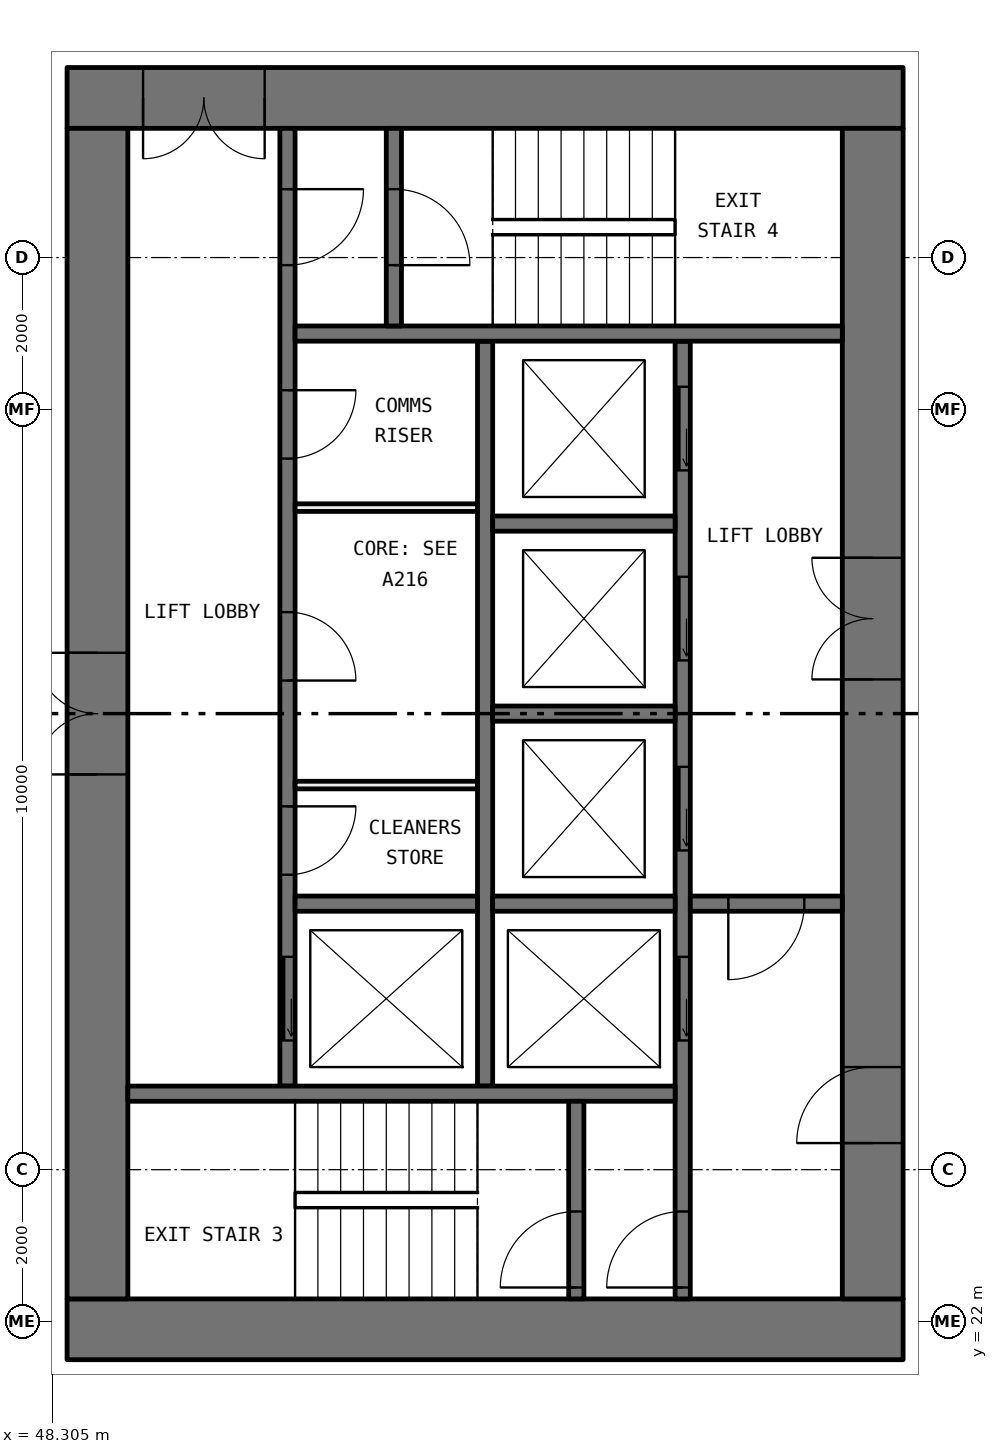
"""IFC4 building model, lengths in metres.
Left out: names, types, materials, properties, quantities, classifications, styles, units other than length and angle.
Written with IfcOpenShell. Run it as: python <this file> out.ifc"""

import sys

from ifc_helpers import new_model, si_unit, direction, frame, frame_2d, origin, place, context, subcontext, project, spatial, rectangle, extrude, element, fill, save


model = new_model("IFC4")
c1 = context("Model", 3, precision=1e-05, world=origin(), true_north=direction((0.0, 1.0)))
c2 = subcontext(c1, "Body", "Model", "MODEL_VIEW")
j1 = project(units=[si_unit("LENGTHUNIT", "METRE"), si_unit("PLANEANGLEUNIT", "RADIAN")], contexts=[c1])
p1 = place(None, origin())
s1 = spatial("IfcSite", under=j1, at=p1, CompositionType="ELEMENT")
p2 = place(p1, origin())
s2 = spatial("IfcBuilding", under=s1, at=p2, CompositionType="ELEMENT")
p3 = place(p2, frame((0.0, 0.0, 64.5)))
s3 = spatial("IfcBuildingStorey", under=s2, at=p3, CompositionType="ELEMENT", Elevation=64.5)
p4 = place(p3, frame((59.5, 21.9, 0.0), z_axis=(0.0, 0.0, 1.0), x_axis=(-1.0, 0.0, 0.0)))
e1 = element("IfcWall", 1, at=p4, inside=s3, PredefinedType="SHEAR", context=c2, shape_type="SweptSolid", body=[
    extrude(rectangle(XDim=11.0, YDim=0.8, at=frame_2d((5.5, 0.0))), origin(), (0.0, 0.0, 1.0), 3.05),
])
p5 = place(p3, frame((59.5, 38.1, 0.0), z_axis=(0.0, 0.0, 1.0), x_axis=(-1.0, 0.0, 0.0)))
e2 = element("IfcWall", 2, at=p5, inside=s3, PredefinedType="SHEAR", context=c2, shape_type="SweptSolid", body=[
    extrude(rectangle(XDim=11.0, YDim=0.8, at=frame_2d((5.5, 0.0))), origin(), (0.0, 0.0, 1.0), 3.05),
])
p6 = place(p5, frame((8.4, 0.0, 0.0)))
e3 = element("IfcOpeningElement", 3, at=p6, cuts=e2, PredefinedType="OPENING", context=c2, shape_type="SweptSolid", body=[
    extrude(rectangle(XDim=1.6, YDim=2.1, at=frame_2d((0.8, 1.05))), frame((0.0, 0.41, 0.0), z_axis=(0.0, -1.0, 0.0), x_axis=(1.0, 0.0, 0.0)), (0.0, 0.0, 1.0), 0.82),
])
p7 = place(p3, frame((59.1, 22.3, 0.0), z_axis=(0.0, 0.0, 1.0), x_axis=(0.0, 1.0, 0.0)))
e4 = element("IfcWall", 4, at=p7, inside=s3, PredefinedType="SHEAR", context=c2, shape_type="SweptSolid", body=[
    extrude(rectangle(XDim=15.4, YDim=0.8, at=frame_2d((7.7, 0.0))), origin(), (0.0, 0.0, 1.0), 3.05),
])
p8 = place(p7, frame((8.15, 0.0, 0.0)))
e5 = element("IfcOpeningElement", 5, at=p8, cuts=e4, PredefinedType="OPENING", context=c2, shape_type="SweptSolid", body=[
    extrude(rectangle(XDim=1.6, YDim=2.1, at=frame_2d((0.8, 1.05))), frame((0.0, 0.41, 0.0), z_axis=(0.0, -1.0, 0.0), x_axis=(1.0, 0.0, 0.0)), (0.0, 0.0, 1.0), 0.82),
])
p9 = place(p7, frame((2.05, 0.0, 0.0)))
e6 = element("IfcOpeningElement", 6, at=p9, cuts=e4, PredefinedType="OPENING", context=c2, shape_type="SweptSolid", body=[
    extrude(rectangle(XDim=1.0, YDim=2.1, at=frame_2d((0.5, 1.05))), frame((0.0, 0.41, 0.0), z_axis=(0.0, -1.0, 0.0), x_axis=(1.0, 0.0, 0.0)), (0.0, 0.0, 1.0), 0.82),
])
p10 = place(p3, frame((48.9, 22.3, 0.0), z_axis=(0.0, 0.0, 1.0), x_axis=(0.0, 1.0, 0.0)))
e7 = element("IfcWall", 7, at=p10, inside=s3, PredefinedType="SHEAR", context=c2, shape_type="SweptSolid", body=[
    extrude(rectangle(XDim=15.4, YDim=0.8, at=frame_2d((7.7, 0.0))), origin(), (0.0, 0.0, 1.0), 3.05),
])
p11 = place(p10, frame((6.9, 0.0, 0.0)))
e8 = element("IfcOpeningElement", 8, at=p11, cuts=e7, PredefinedType="OPENING", context=c2, shape_type="SweptSolid", body=[
    extrude(rectangle(XDim=1.6, YDim=2.1, at=frame_2d((0.8, 1.05))), frame((0.0, 0.41, 0.0), z_axis=(0.0, -1.0, 0.0), x_axis=(1.0, 0.0, 0.0)), (0.0, 0.0, 1.0), 0.82),
])
p12 = place(p3, frame((56.6, 22.3, 0.0), z_axis=(0.0, 0.0, 1.0), x_axis=(0.0, 1.0, 0.0)))
e9 = element("IfcWall", 9, at=p12, inside=s3, PredefinedType="SOLIDWALL", context=c2, shape_type="SweptSolid", body=[
    extrude(rectangle(XDim=12.6, YDim=0.2, at=frame_2d((6.3, 0.0))), origin(), (0.0, 0.0, 1.0), 3.05),
])
p13 = place(p12, frame((3.4, 0.0, 0.0)))
e10 = element("IfcOpeningElement", 10, at=p13, cuts=e9, PredefinedType="OPENING", context=c2, shape_type="SweptSolid", body=[
    extrude(rectangle(XDim=1.1, YDim=2.1, at=frame_2d((0.55, 1.05))), frame((0.0, 0.11, 0.0), z_axis=(0.0, -1.0, 0.0), x_axis=(1.0, 0.0, 0.0)), (0.0, 0.0, 1.0), 0.22),
])
p14 = place(p12, frame((5.9, 0.0, 0.0)))
e11 = element("IfcOpeningElement", 11, at=p14, cuts=e9, PredefinedType="OPENING", context=c2, shape_type="SweptSolid", body=[
    extrude(rectangle(XDim=1.1, YDim=2.1, at=frame_2d((0.55, 1.05))), frame((0.0, 0.11, 0.0), z_axis=(0.0, -1.0, 0.0), x_axis=(1.0, 0.0, 0.0)), (0.0, 0.0, 1.0), 0.22),
])
p15 = place(p12, frame((8.4, 0.0, 0.0)))
e12 = element("IfcOpeningElement", 12, at=p15, cuts=e9, PredefinedType="OPENING", context=c2, shape_type="SweptSolid", body=[
    extrude(rectangle(XDim=1.1, YDim=2.1, at=frame_2d((0.55, 1.05))), frame((0.0, 0.11, 0.0), z_axis=(0.0, -1.0, 0.0), x_axis=(1.0, 0.0, 0.0)), (0.0, 0.0, 1.0), 0.22),
])
p16 = place(p12, frame((10.9, 0.0, 0.0)))
e13 = element("IfcOpeningElement", 13, at=p16, cuts=e9, PredefinedType="OPENING", context=c2, shape_type="SweptSolid", body=[
    extrude(rectangle(XDim=1.1, YDim=2.1, at=frame_2d((0.55, 1.05))), frame((0.0, 0.11, 0.0), z_axis=(0.0, -1.0, 0.0), x_axis=(1.0, 0.0, 0.0)), (0.0, 0.0, 1.0), 0.22),
])
p17 = place(p12, frame((0.15, 0.0, 0.0)))
e14 = element("IfcOpeningElement", 14, at=p17, cuts=e9, PredefinedType="OPENING", context=c2, shape_type="SweptSolid", body=[
    extrude(rectangle(XDim=1.0, YDim=2.1, at=frame_2d((0.5, 1.05))), frame((0.0, 0.11, 0.0), z_axis=(0.0, -1.0, 0.0), x_axis=(1.0, 0.0, 0.0)), (0.0, 0.0, 1.0), 0.22),
])
p18 = place(p3, frame((51.4, 25.1, 0.0), z_axis=(0.0, 0.0, 1.0), x_axis=(0.0, 1.0, 0.0)))
e15 = element("IfcWall", 15, at=p18, inside=s3, PredefinedType="SOLIDWALL", context=c2, shape_type="SweptSolid", body=[
    extrude(rectangle(XDim=12.6, YDim=0.2, at=frame_2d((6.3, 0.0))), origin(), (0.0, 0.0, 1.0), 3.05),
])
p19 = place(p18, frame((0.6, 0.0, 0.0)))
e16 = element("IfcOpeningElement", 16, at=p19, cuts=e15, PredefinedType="OPENING", context=c2, shape_type="SweptSolid", body=[
    extrude(rectangle(XDim=1.1, YDim=2.1, at=frame_2d((0.55, 1.05))), frame((0.0, 0.11, 0.0), z_axis=(0.0, -1.0, 0.0), x_axis=(1.0, 0.0, 0.0)), (0.0, 0.0, 1.0), 0.22),
])
p20 = place(p18, frame((10.8, 0.0, 0.0)))
e17 = element("IfcOpeningElement", 17, at=p20, cuts=e15, PredefinedType="OPENING", context=c2, shape_type="SweptSolid", body=[
    extrude(rectangle(XDim=1.0, YDim=2.1, at=frame_2d((0.5, 1.05))), frame((0.0, 0.11, 0.0), z_axis=(0.0, -1.0, 0.0), x_axis=(1.0, 0.0, 0.0)), (0.0, 0.0, 1.0), 0.22),
])
p21 = place(p18, frame((2.78, 0.0, 0.0)))
e18 = element("IfcOpeningElement", 18, at=p21, cuts=e15, PredefinedType="OPENING", context=c2, shape_type="SweptSolid", body=[
    extrude(rectangle(XDim=0.9, YDim=2.1, at=frame_2d((0.45, 1.05))), frame((0.0, 0.11, 0.0), z_axis=(0.0, -1.0, 0.0), x_axis=(1.0, 0.0, 0.0)), (0.0, 0.0, 1.0), 0.22),
])
p22 = place(p18, frame((5.335, 0.0, 0.0)))
e19 = element("IfcOpeningElement", 19, at=p22, cuts=e15, PredefinedType="OPENING", context=c2, shape_type="SweptSolid", body=[
    extrude(rectangle(XDim=0.9, YDim=2.1, at=frame_2d((0.45, 1.05))), frame((0.0, 0.11, 0.0), z_axis=(0.0, -1.0, 0.0), x_axis=(1.0, 0.0, 0.0)), (0.0, 0.0, 1.0), 0.22),
])
p23 = place(p18, frame((8.255, 0.0, 0.0)))
e20 = element("IfcOpeningElement", 20, at=p23, cuts=e15, PredefinedType="OPENING", context=c2, shape_type="SweptSolid", body=[
    extrude(rectangle(XDim=0.9, YDim=2.1, at=frame_2d((0.45, 1.05))), frame((0.0, 0.11, 0.0), z_axis=(0.0, -1.0, 0.0), x_axis=(1.0, 0.0, 0.0)), (0.0, 0.0, 1.0), 0.22),
])
p24 = place(p3, frame((54.0, 25.1, 0.0), z_axis=(0.0, 0.0, 1.0), x_axis=(0.0, 1.0, 0.0)))
e21 = element("IfcWall", 21, at=p24, inside=s3, PredefinedType="SOLIDWALL", context=c2, shape_type="SweptSolid", body=[
    extrude(rectangle(XDim=9.8, YDim=0.2, at=frame_2d((4.9, 0.0))), origin(), (0.0, 0.0, 1.0), 3.05),
])
for number, where, z_axis, x_axis in (
    (22, (56.5, 25.0, 0.0), (0.0, 0.0, 1.0), (-1.0, 0.0, 0.0)),
    (23, (58.7, 35.0, 0.0), (0.0, 0.0, 1.0), (-1.0, 0.0, 0.0)),
):
    element("IfcWall", number, at=place(p3, frame(where, z_axis=z_axis, x_axis=x_axis)), inside=s3, PredefinedType="SOLIDWALL", context=c2, shape_type="SweptSolid", body=[
        extrude(rectangle(XDim=7.2, YDim=0.2, at=frame_2d((3.6, 0.0))), origin(), (0.0, 0.0, 1.0), 3.05),
    ])
p25 = place(p3, frame((58.7, 27.5, 0.0), z_axis=(0.0, 0.0, 1.0), x_axis=(-1.0, 0.0, 0.0)))
e24 = element("IfcWall", 24, at=p25, inside=s3, PredefinedType="SOLIDWALL", context=c2, shape_type="SweptSolid", body=[
    extrude(rectangle(XDim=2.0, YDim=0.2, at=frame_2d((1.0, 0.0))), origin(), (0.0, 0.0, 1.0), 3.05),
])
p26 = place(p25, frame((0.5, 0.0, 0.0)))
e25 = element("IfcOpeningElement", 25, at=p26, cuts=e24, PredefinedType="OPENING", context=c2, shape_type="SweptSolid", body=[
    extrude(rectangle(XDim=1.0, YDim=2.1, at=frame_2d((0.5, 1.05))), frame((0.0, 0.11, 0.0), z_axis=(0.0, -1.0, 0.0), x_axis=(1.0, 0.0, 0.0)), (0.0, 0.0, 1.0), 0.22),
])
p27 = place(p3, frame((55.2, 22.3, 0.0), z_axis=(0.0, 0.0, 1.0), x_axis=(0.0, 1.0, 0.0)))
e26 = element("IfcWall", 26, at=p27, inside=s3, PredefinedType="SOLIDWALL", context=c2, shape_type="SweptSolid", body=[
    extrude(rectangle(XDim=2.6, YDim=0.2, at=frame_2d((1.3, 0.0))), origin(), (0.0, 0.0, 1.0), 3.05),
])
p28 = place(p27, frame((0.15, 0.0, 0.0)))
e27 = element("IfcOpeningElement", 27, at=p28, cuts=e26, PredefinedType="OPENING", context=c2, shape_type="SweptSolid", body=[
    extrude(rectangle(XDim=1.0, YDim=2.1, at=frame_2d((0.5, 1.05))), frame((0.0, 0.11, 0.0), z_axis=(0.0, -1.0, 0.0), x_axis=(1.0, 0.0, 0.0)), (0.0, 0.0, 1.0), 0.22),
])
p29 = place(p3, frame((52.8, 35.1, 0.0), z_axis=(0.0, 0.0, 1.0), x_axis=(0.0, 1.0, 0.0)))
e28 = element("IfcWall", 28, at=p29, inside=s3, PredefinedType="SOLIDWALL", context=c2, shape_type="SweptSolid", body=[
    extrude(rectangle(XDim=2.6, YDim=0.2, at=frame_2d((1.3, 0.0))), origin(), (0.0, 0.0, 1.0), 3.05),
])
p30 = place(p29, frame((0.8, 0.0, 0.0)))
e29 = element("IfcOpeningElement", 29, at=p30, cuts=e28, PredefinedType="OPENING", context=c2, shape_type="SweptSolid", body=[
    extrude(rectangle(XDim=1.0, YDim=2.1, at=frame_2d((0.5, 1.05))), frame((0.0, 0.11, 0.0), z_axis=(0.0, -1.0, 0.0), x_axis=(1.0, 0.0, 0.0)), (0.0, 0.0, 1.0), 0.22),
])
for number, where, z_axis, x_axis in (
    (30, (56.5, 27.5, 0.0), (0.0, 0.0, 1.0), (-1.0, 0.0, 0.0)),
    (31, (56.5, 30.0, 0.0), (0.0, 0.0, 1.0), (-1.0, 0.0, 0.0)),
    (32, (56.5, 32.5, 0.0), (0.0, 0.0, 1.0), (-1.0, 0.0, 0.0)),
    (33, (53.9, 27.5, 0.0), (0.0, 0.0, 1.0), (-1.0, 0.0, 0.0)),
):
    element("IfcWall", number, at=place(p3, frame(where, z_axis=z_axis, x_axis=x_axis)), inside=s3, PredefinedType="SOLIDWALL", context=c2, shape_type="SweptSolid", body=[
        extrude(rectangle(XDim=2.4, YDim=0.2, at=frame_2d((1.2, 0.0))), origin(), (0.0, 0.0, 1.0), 3.05),
    ])
for number, where, z_axis, x_axis in (
    (34, (53.9, 29.06, 0.0), (0.0, 0.0, 1.0), (-1.0, 0.0, 0.0)),
    (35, (53.9, 32.71, 0.0), (0.0, 0.0, 1.0), (-1.0, 0.0, 0.0)),
):
    element("IfcWall", number, at=place(p3, frame(where, z_axis=z_axis, x_axis=x_axis)), inside=s3, PredefinedType="PARTITIONING", context=c2, shape_type="SweptSolid", body=[
        extrude(rectangle(XDim=2.4, YDim=0.1, at=frame_2d((1.2, 0.0))), origin(), (0.0, 0.0, 1.0), 3.05),
    ])
p31 = place(p19, origin())
e36 = element("IfcDoor", 36, at=p31, inside=s3, OperationType="SLIDING_TO_LEFT", PredefinedType="DOOR", context=c2, shape_type="SweptSolid", body=[
    extrude(rectangle(XDim=1.1, YDim=2.1, at=frame_2d((0.55, 1.05))), frame((0.0, 0.025, 0.0), z_axis=(0.0, -1.0, 0.0), x_axis=(1.0, 0.0, 0.0)), (0.0, 0.0, 1.0), 0.05),
])
fill(e16, e36)
p32 = place(p13, origin())
e37 = element("IfcDoor", 37, at=p32, inside=s3, OperationType="SLIDING_TO_LEFT", PredefinedType="DOOR", context=c2, shape_type="SweptSolid", body=[
    extrude(rectangle(XDim=1.1, YDim=2.1, at=frame_2d((0.55, 1.05))), frame((0.0, 0.025, 0.0), z_axis=(0.0, -1.0, 0.0), x_axis=(1.0, 0.0, 0.0)), (0.0, 0.0, 1.0), 0.05),
])
fill(e10, e37)
p33 = place(p14, origin())
e38 = element("IfcDoor", 38, at=p33, inside=s3, OperationType="SLIDING_TO_LEFT", PredefinedType="DOOR", context=c2, shape_type="SweptSolid", body=[
    extrude(rectangle(XDim=1.1, YDim=2.1, at=frame_2d((0.55, 1.05))), frame((0.0, 0.025, 0.0), z_axis=(0.0, -1.0, 0.0), x_axis=(1.0, 0.0, 0.0)), (0.0, 0.0, 1.0), 0.05),
])
fill(e11, e38)
p34 = place(p15, origin())
e39 = element("IfcDoor", 39, at=p34, inside=s3, OperationType="SLIDING_TO_LEFT", PredefinedType="DOOR", context=c2, shape_type="SweptSolid", body=[
    extrude(rectangle(XDim=1.1, YDim=2.1, at=frame_2d((0.55, 1.05))), frame((0.0, 0.025, 0.0), z_axis=(0.0, -1.0, 0.0), x_axis=(1.0, 0.0, 0.0)), (0.0, 0.0, 1.0), 0.05),
])
fill(e12, e39)
p35 = place(p16, origin())
e40 = element("IfcDoor", 40, at=p35, inside=s3, OperationType="SLIDING_TO_LEFT", PredefinedType="DOOR", context=c2, shape_type="SweptSolid", body=[
    extrude(rectangle(XDim=1.1, YDim=2.1, at=frame_2d((0.55, 1.05))), frame((0.0, 0.025, 0.0), z_axis=(0.0, -1.0, 0.0), x_axis=(1.0, 0.0, 0.0)), (0.0, 0.0, 1.0), 0.05),
])
fill(e13, e40)
p36 = place(p28, origin())
e41 = element("IfcDoor", 41, at=p36, inside=s3, OperationType="SINGLE_SWING_RIGHT", PredefinedType="DOOR", context=c2, shape_type="SweptSolid", body=[
    extrude(rectangle(XDim=1.0, YDim=2.1, at=frame_2d((0.5, 1.05))), frame((0.0, 0.025, 0.0), z_axis=(0.0, -1.0, 0.0), x_axis=(1.0, 0.0, 0.0)), (0.0, 0.0, 1.0), 0.05),
])
fill(e27, e41)
p37 = place(p17, origin())
e42 = element("IfcDoor", 42, at=p37, inside=s3, OperationType="SINGLE_SWING_RIGHT", PredefinedType="DOOR", context=c2, shape_type="SweptSolid", body=[
    extrude(rectangle(XDim=1.0, YDim=2.1, at=frame_2d((0.5, 1.05))), frame((0.0, 0.025, 0.0), z_axis=(0.0, -1.0, 0.0), x_axis=(1.0, 0.0, 0.0)), (0.0, 0.0, 1.0), 0.05),
])
fill(e14, e42)
p38 = place(p20, frame((1.0, 0.0, 0.0), x_axis=(-1.0, 0.0, 0.0)))
e43 = element("IfcDoor", 43, at=p38, inside=s3, OperationType="SINGLE_SWING_RIGHT", PredefinedType="DOOR", context=c2, shape_type="SweptSolid", body=[
    extrude(rectangle(XDim=1.0, YDim=2.1, at=frame_2d((0.5, 1.05))), frame((0.0, 0.025, 0.0), z_axis=(0.0, -1.0, 0.0), x_axis=(1.0, 0.0, 0.0)), (0.0, 0.0, 1.0), 0.05),
])
fill(e17, e43)
p39 = place(p30, frame((1.0, 0.0, 0.0), x_axis=(-1.0, 0.0, 0.0)))
e44 = element("IfcDoor", 44, at=p39, inside=s3, OperationType="SINGLE_SWING_LEFT", PredefinedType="DOOR", context=c2, shape_type="SweptSolid", body=[
    extrude(rectangle(XDim=1.0, YDim=2.1, at=frame_2d((0.5, 1.05))), frame((0.0, 0.025, 0.0), z_axis=(0.0, -1.0, 0.0), x_axis=(1.0, 0.0, 0.0)), (0.0, 0.0, 1.0), 0.05),
])
fill(e29, e44)
p40 = place(p26, origin())
e45 = element("IfcDoor", 45, at=p40, inside=s3, OperationType="SINGLE_SWING_LEFT", PredefinedType="DOOR", context=c2, shape_type="SweptSolid", body=[
    extrude(rectangle(XDim=1.0, YDim=2.1, at=frame_2d((0.5, 1.05))), frame((0.0, 0.025, 0.0), z_axis=(0.0, -1.0, 0.0), x_axis=(1.0, 0.0, 0.0)), (0.0, 0.0, 1.0), 0.05),
])
fill(e25, e45)
p41 = place(p8, origin())
e46 = element("IfcDoor", 46, at=p41, inside=s3, OperationType="DOUBLE_DOOR_SINGLE_SWING", PredefinedType="DOOR", context=c2, shape_type="SweptSolid", body=[
    extrude(rectangle(XDim=1.6, YDim=2.1, at=frame_2d((0.8, 1.05))), frame((0.0, 0.025, 0.0), z_axis=(0.0, -1.0, 0.0), x_axis=(1.0, 0.0, 0.0)), (0.0, 0.0, 1.0), 0.05),
])
fill(e5, e46)
p42 = place(p9, origin())
e47 = element("IfcDoor", 47, at=p42, inside=s3, OperationType="SINGLE_SWING_RIGHT", PredefinedType="DOOR", context=c2, shape_type="SweptSolid", body=[
    extrude(rectangle(XDim=1.0, YDim=2.1, at=frame_2d((0.5, 1.05))), frame((0.0, 0.025, 0.0), z_axis=(0.0, -1.0, 0.0), x_axis=(1.0, 0.0, 0.0)), (0.0, 0.0, 1.0), 0.05),
])
fill(e6, e47)
p43 = place(p6, origin())
e48 = element("IfcDoor", 48, at=p43, inside=s3, OperationType="DOUBLE_DOOR_SINGLE_SWING", PredefinedType="DOOR", context=c2, shape_type="SweptSolid", body=[
    extrude(rectangle(XDim=1.6, YDim=2.1, at=frame_2d((0.8, 1.05))), frame((0.0, 0.025, 0.0), z_axis=(0.0, -1.0, 0.0), x_axis=(1.0, 0.0, 0.0)), (0.0, 0.0, 1.0), 0.05),
])
fill(e3, e48)
p44 = place(p11, origin())
e49 = element("IfcDoor", 49, at=p44, inside=s3, OperationType="DOUBLE_DOOR_SINGLE_SWING", PredefinedType="DOOR", context=c2, shape_type="SweptSolid", body=[
    extrude(rectangle(XDim=1.6, YDim=2.1, at=frame_2d((0.8, 1.05))), frame((0.0, 0.025, 0.0), z_axis=(0.0, -1.0, 0.0), x_axis=(1.0, 0.0, 0.0)), (0.0, 0.0, 1.0), 0.05),
])
fill(e8, e49)
p45 = place(p21, frame((0.9, 0.0, 0.0), x_axis=(-1.0, 0.0, 0.0)))
e50 = element("IfcDoor", 50, at=p45, inside=s3, OperationType="SINGLE_SWING_RIGHT", PredefinedType="DOOR", context=c2, shape_type="SweptSolid", body=[
    extrude(rectangle(XDim=0.9, YDim=2.1, at=frame_2d((0.45, 1.05))), frame((0.0, 0.025, 0.0), z_axis=(0.0, -1.0, 0.0), x_axis=(1.0, 0.0, 0.0)), (0.0, 0.0, 1.0), 0.05),
])
fill(e18, e50)
p46 = place(p22, frame((0.9, 0.0, 0.0), x_axis=(-1.0, 0.0, 0.0)))
e51 = element("IfcDoor", 51, at=p46, inside=s3, OperationType="SINGLE_SWING_LEFT", PredefinedType="DOOR", context=c2, shape_type="SweptSolid", body=[
    extrude(rectangle(XDim=0.9, YDim=2.1, at=frame_2d((0.45, 1.05))), frame((0.0, 0.025, 0.0), z_axis=(0.0, -1.0, 0.0), x_axis=(1.0, 0.0, 0.0)), (0.0, 0.0, 1.0), 0.05),
])
fill(e19, e51)
p47 = place(p23, frame((0.9, 0.0, 0.0), x_axis=(-1.0, 0.0, 0.0)))
e52 = element("IfcDoor", 52, at=p47, inside=s3, OperationType="SINGLE_SWING_RIGHT", PredefinedType="DOOR", context=c2, shape_type="SweptSolid", body=[
    extrude(rectangle(XDim=0.9, YDim=2.1, at=frame_2d((0.45, 1.05))), frame((0.0, 0.025, 0.0), z_axis=(0.0, -1.0, 0.0), x_axis=(1.0, 0.0, 0.0)), (0.0, 0.0, 1.0), 0.05),
])
fill(e20, e52)
save(model, sys.argv[1])
